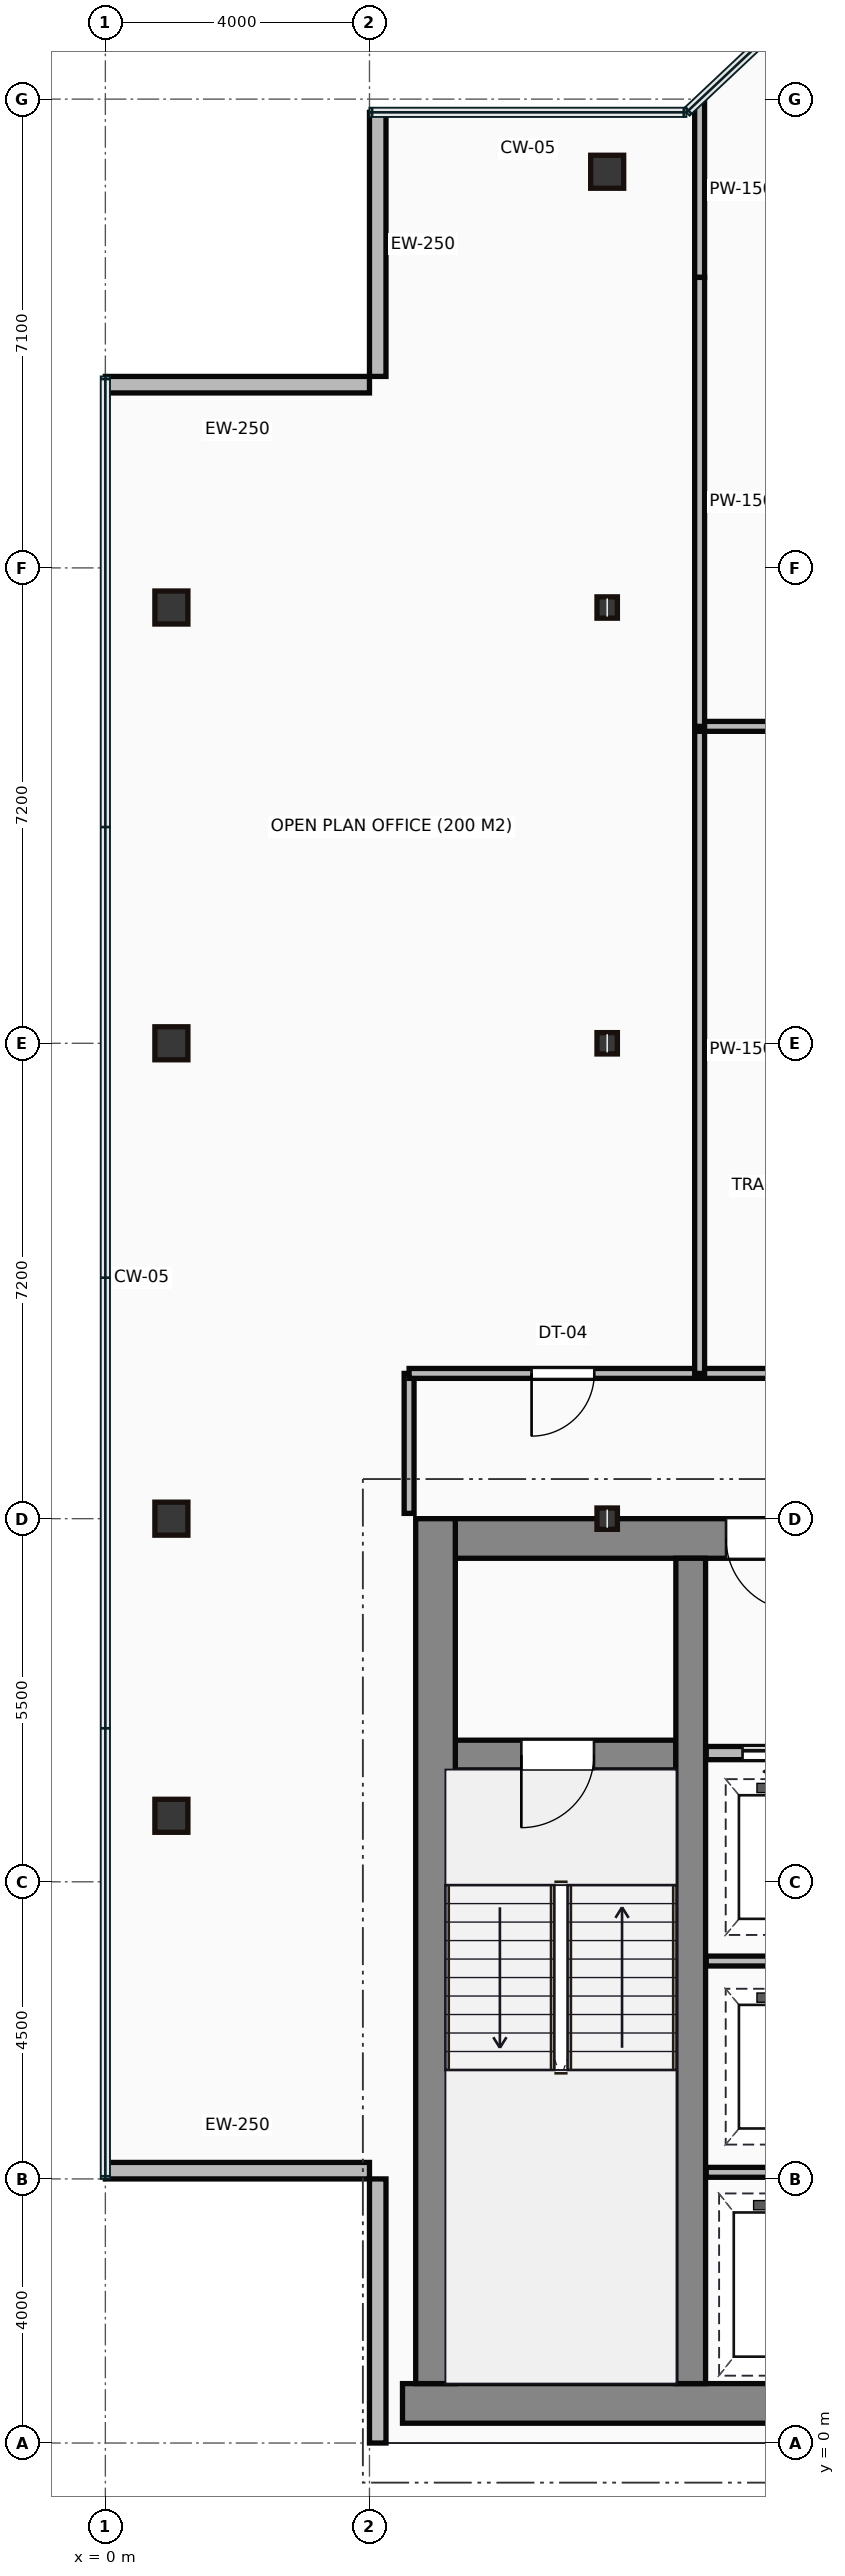
"""IFC4 building model, lengths in metres.
Left out: names, types, materials, properties, quantities, classifications, styles, units other than length and angle.
Written with IfcOpenShell. Run it as: python <this file> out.ifc"""

import sys

from ifc_helpers import new_model, si_unit, direction, frame, frame_2d, origin, origin_2d, place, context, subcontext, project, spatial, rectangle, hollow_rectangle, i_section, extrude, source, transform, mapped, element, fill, save


model = new_model("IFC4")
c1 = context("Model", 3, precision=1e-05, world=origin(), true_north=direction((0.0, 1.0)))
c2 = subcontext(c1, "Body", "Model", "MODEL_VIEW")
j1 = project(units=[si_unit("LENGTHUNIT", "METRE"), si_unit("PLANEANGLEUNIT", "RADIAN")], contexts=[c1])
p1 = place(None, origin())
s1 = spatial("IfcSite", under=j1, at=p1, CompositionType="ELEMENT")
p2 = place(p1, origin())
s2 = spatial("IfcBuilding", under=s1, at=p2, CompositionType="ELEMENT")
p3 = place(p2, frame((0.0, 0.0, 258.8)))
s3 = spatial("IfcBuildingStorey", under=s2, at=p3, CompositionType="ELEMENT", Elevation=258.8)
m1 = source(origin(), c2, "Body", "SweptSolid", [
    extrude(rectangle(XDim=29.5, YDim=0.6, at=frame_2d((14.75, 0.0))), origin(), (0.0, 0.0, 1.0), 3.65),
])
p4 = place(p3, frame((4.5, 0.6, 0.0), z_axis=(0.0, 0.0, 1.0), x_axis=(1.0, 0.0, 0.0)))
e1 = element("IfcWall", 1, at=p4, inside=s3, PredefinedType="SHEAR", context=c2, shape_type="MappedRepresentation", body=[
    mapped(m1, transform((0.0, 0.0, 0.0))),
])
m2 = source(origin(), c2, "Body", "SweptSolid", [
    extrude(rectangle(XDim=13.1, YDim=0.6, at=frame_2d((6.55, 0.0))), origin(), (0.0, 0.0, 1.0), 3.65),
])
p5 = place(p3, frame((5.0, 0.9, 0.0), z_axis=(0.0, 0.0, 1.0), x_axis=(0.0, 1.0, 0.0)))
e2 = element("IfcWall", 2, at=p5, inside=s3, PredefinedType="SHEAR", context=c2, shape_type="MappedRepresentation", body=[
    mapped(m2, transform((0.0, 0.0, 0.0))),
])
m3 = source(origin(), c2, "Body", "SweptSolid", [
    extrude(rectangle(XDim=9.1, YDim=0.6, at=frame_2d((4.55, 0.0))), origin(), (0.0, 0.0, 1.0), 3.65),
])
p6 = place(p3, frame((5.3, 13.7, 0.0), z_axis=(0.0, 0.0, 1.0), x_axis=(1.0, 0.0, 0.0)))
e3 = element("IfcWall", 3, at=p6, inside=s3, PredefinedType="SHEAR", context=c2, shape_type="MappedRepresentation", body=[
    mapped(m3, transform((0.0, 0.0, 0.0))),
])
p7 = place(p6, frame((4.1, 0.0, 0.0)))
e4 = element("IfcOpeningElement", 4, at=p7, cuts=e3, PredefinedType="OPENING", context=c2, shape_type="SweptSolid", body=[
    extrude(rectangle(XDim=1.1, YDim=2.15, at=frame_2d((0.55, 1.075))), frame((0.0, 0.31, 0.0), z_axis=(0.0, -1.0, 0.0), x_axis=(1.0, 0.0, 0.0)), (0.0, 0.0, 1.0), 0.62),
])
m4 = source(origin(), c2, "Body", "SweptSolid", [
    extrude(rectangle(XDim=12.5, YDim=0.45, at=frame_2d((6.25, 0.0))), origin(), (0.0, 0.0, 1.0), 3.65),
])
p8 = place(p3, frame((8.865, 0.9, 0.0), z_axis=(0.0, 0.0, 1.0), x_axis=(0.0, 1.0, 0.0)))
e5 = element("IfcWall", 5, at=p8, inside=s3, PredefinedType="SHEAR", context=c2, shape_type="MappedRepresentation", body=[
    mapped(m4, transform((0.0, 0.0, 0.0))),
])
m5 = source(origin(), c2, "Body", "SweptSolid", [
    extrude(rectangle(XDim=3.39, YDim=0.45, at=frame_2d((1.695, 0.0))), origin(), (0.0, 0.0, 1.0), 3.65),
])
p9 = place(p3, frame((5.25, 10.42, 0.0), z_axis=(0.0, 0.0, 1.0), x_axis=(1.0, 0.0, 0.0)))
e6 = element("IfcWall", 6, at=p9, inside=s3, PredefinedType="SHEAR", context=c2, shape_type="MappedRepresentation", body=[
    mapped(m5, transform((0.0, 0.0, 0.0))),
])
p10 = place(p9, frame((1.05, 0.0, 0.0)))
e7 = element("IfcOpeningElement", 7, at=p10, cuts=e6, PredefinedType="OPENING", context=c2, shape_type="SweptSolid", body=[
    extrude(rectangle(XDim=1.1, YDim=2.15, at=frame_2d((0.55, 1.075))), frame((0.0, 0.235, 0.0), z_axis=(0.0, -1.0, 0.0), x_axis=(1.0, 0.0, 0.0)), (0.0, 0.0, 1.0), 0.47),
])
m6 = source(origin(), c2, "Body", "SweptSolid", [
    extrude(hollow_rectangle(XDim=0.5, YDim=0.5, WallThickness=0.022, at=origin_2d()), origin(), (0.0, 0.0, 1.0), 3.65),
])
for number, where, z_axis, x_axis in (
    (8, (1.0, 9.5, 0.0), (0.0, 0.0, 1.0), (1.0, 0.0, 0.0)),
    (9, (1.0, 14.0, 0.0), (0.0, 0.0, 1.0), (1.0, 0.0, 0.0)),
    (10, (1.0, 21.2, 0.0), (0.0, 0.0, 1.0), (1.0, 0.0, 0.0)),
    (11, (1.0, 27.8, 0.0), (0.0, 0.0, 1.0), (1.0, 0.0, 0.0)),
):
    element("IfcColumn", number, at=place(p3, frame(where, z_axis=z_axis, x_axis=x_axis)), inside=s3, PredefinedType="COLUMN", context=c2, shape_type="MappedRepresentation", body=[
        mapped(m6, transform((0.0, 0.0, 0.0))),
    ])
m7 = source(origin(), c2, "Body", "SweptSolid", [
    extrude(i_section(OverallWidth=0.309, OverallDepth=0.323, WebThickness=0.014, FlangeThickness=0.023, at=origin_2d()), origin(), (0.0, 0.0, 1.0), 3.65),
])
for number, where, z_axis, x_axis in (
    (12, (7.6, 14.0, 0.0), (0.0, 0.0, 1.0), (1.0, 0.0, 0.0)),
    (13, (7.6, 21.2, 0.0), (0.0, 0.0, 1.0), (1.0, 0.0, 0.0)),
    (14, (7.6, 27.8, 0.0), (0.0, 0.0, 1.0), (1.0, 0.0, 0.0)),
):
    element("IfcColumn", number, at=place(p3, frame(where, z_axis=z_axis, x_axis=x_axis)), inside=s3, PredefinedType="COLUMN", context=c2, shape_type="MappedRepresentation", body=[
        mapped(m7, transform((0.0, 0.0, 0.0))),
    ])
p11 = place(p3, frame((7.6, 34.4, 0.0), z_axis=(0.0, 0.0, 1.0), x_axis=(1.0, 0.0, 0.0)))
e15 = element("IfcColumn", 15, at=p11, inside=s3, PredefinedType="COLUMN", context=c2, shape_type="MappedRepresentation", body=[
    mapped(m6, transform((0.0, 0.0, 0.0))),
])
m8 = source(origin(), c2, "Body", "SweptSolid", [
    extrude(rectangle(XDim=4.0, YDim=0.25, at=frame_2d((2.0, 0.0))), origin(), (0.0, 0.0, 1.0), 3.4),
])
for number, where, z_axis, x_axis in (
    (16, (4.125, 35.3, 0.0), (0.0, 0.0, 1.0), (0.0, -1.0, 0.0)),
    (17, (4.0, 31.175, 0.0), (0.0, 0.0, 1.0), (-1.0, 0.0, 0.0)),
    (18, (0.0, 4.125, 0.0), (0.0, 0.0, 1.0), (1.0, 0.0, 0.0)),
    (19, (4.125, 4.0, 0.0), (0.0, 0.0, 1.0), (0.0, -1.0, 0.0)),
):
    element("IfcWall", number, at=place(p3, frame(where, z_axis=z_axis, x_axis=x_axis)), inside=s3, PredefinedType="STANDARD", context=c2, shape_type="MappedRepresentation", body=[
        mapped(m8, transform((0.0, 0.0, 0.0))),
    ])
m9 = source(origin(), c2, "Body", "SweptSolid", [
    extrude(rectangle(XDim=2.35, YDim=0.2, at=frame_2d((1.175, 0.0))), origin(), (0.0, 0.0, 1.0), 3.4),
])
p12 = place(p3, frame((9.1, 10.45, 0.0), z_axis=(0.0, 0.0, 1.0), x_axis=(1.0, 0.0, 0.0)))
e20 = element("IfcWall", 20, at=p12, inside=s3, PredefinedType="PARTITIONING", context=c2, shape_type="MappedRepresentation", body=[
    mapped(m9, transform((0.0, 0.0, 0.0))),
])
p13 = place(p12, frame((0.55, 0.0, 0.0)))
e21 = element("IfcOpeningElement", 21, at=p13, cuts=e20, PredefinedType="OPENING", context=c2, shape_type="SweptSolid", body=[
    extrude(rectangle(XDim=1.1, YDim=2.15, at=frame_2d((0.55, 1.075))), frame((0.0, 0.11, 0.0), z_axis=(0.0, -1.0, 0.0), x_axis=(1.0, 0.0, 0.0)), (0.0, 0.0, 1.0), 0.22),
])
m10 = source(origin(), c2, "Body", "SweptSolid", [
    extrude(rectangle(XDim=2.4, YDim=0.15, at=frame_2d((1.2, 0.0))), origin(), (0.0, 0.0, 1.0), 3.4),
])
for number, where, z_axis, x_axis in (
    (22, (9.1, 4.1, 0.0), (0.0, 0.0, 1.0), (1.0, 0.0, 0.0)),
    (23, (9.1, 7.3, 0.0), (0.0, 0.0, 1.0), (1.0, 0.0, 0.0)),
):
    element("IfcWall", number, at=place(p3, frame(where, z_axis=z_axis, x_axis=x_axis)), inside=s3, PredefinedType="PARTITIONING", context=c2, shape_type="MappedRepresentation", body=[
        mapped(m10, transform((0.0, 0.0, 0.0))),
    ])
m11 = source(origin(), c2, "Body", "SweptSolid", [
    extrude(rectangle(XDim=2.12, YDim=0.15, at=frame_2d((1.06, 0.0))), origin(), (0.0, 0.0, 1.0), 3.4),
])
p14 = place(p3, frame((4.6, 14.08, 0.0), z_axis=(0.0, 0.0, 1.0), x_axis=(0.0, 1.0, 0.0)))
e24 = element("IfcWall", 24, at=p14, inside=s3, PredefinedType="PARTITIONING", context=c2, shape_type="MappedRepresentation", body=[
    mapped(m11, transform((0.0, 0.0, 0.0))),
])
m12 = source(origin(), c2, "Body", "SweptSolid", [
    extrude(rectangle(XDim=12.2, YDim=0.15, at=frame_2d((6.1, 0.0))), origin(), (0.0, 0.0, 1.0), 3.4),
])
p15 = place(p3, frame((4.6, 16.2, 0.0), z_axis=(0.0, 0.0, 1.0), x_axis=(1.0, 0.0, 0.0)))
e25 = element("IfcWall", 25, at=p15, inside=s3, PredefinedType="PARTITIONING", context=c2, shape_type="MappedRepresentation", body=[
    mapped(m12, transform((0.0, 0.0, 0.0))),
])
p16 = place(p15, frame((1.855, 0.0, 0.0)))
e26 = element("IfcOpeningElement", 26, at=p16, cuts=e25, PredefinedType="OPENING", context=c2, shape_type="SweptSolid", body=[
    extrude(rectangle(XDim=0.95, YDim=2.15, at=frame_2d((0.475, 1.075))), frame((0.0, 0.085, 0.0), z_axis=(0.0, -1.0, 0.0), x_axis=(1.0, 0.0, 0.0)), (0.0, 0.0, 1.0), 0.17),
])
m13 = source(origin(), c2, "Body", "SweptSolid", [
    extrude(rectangle(XDim=9.8, YDim=0.15, at=frame_2d((4.9, 0.0))), origin(), (0.0, 0.0, 1.0), 3.4),
])
p17 = place(p3, frame((9.0, 26.0, 0.0), z_axis=(0.0, 0.0, 1.0), x_axis=(0.0, -1.0, 0.0)))
e27 = element("IfcWall", 27, at=p17, inside=s3, PredefinedType="PARTITIONING", context=c2, shape_type="MappedRepresentation", body=[
    mapped(m13, transform((0.0, 0.0, 0.0))),
])
m14 = source(origin(), c2, "Body", "SweptSolid", [
    extrude(rectangle(XDim=7.8, YDim=0.15, at=frame_2d((3.9, 0.0))), origin(), (0.0, 0.0, 1.0), 3.4),
])
p18 = place(p3, frame((9.0, 26.0, 0.0), z_axis=(0.0, 0.0, 1.0), x_axis=(1.0, 0.0, 0.0)))
e28 = element("IfcWall", 28, at=p18, inside=s3, PredefinedType="PARTITIONING", context=c2, shape_type="MappedRepresentation", body=[
    mapped(m14, transform((0.0, 0.0, 0.0))),
])
m15 = source(origin(), c2, "Body", "SweptSolid", [
    extrude(rectangle(XDim=2.661, YDim=0.15, at=frame_2d((1.33, 0.0))), origin(), (0.0, 0.0, 1.0), 3.4),
])
p19 = place(p3, frame((9.0, 35.461, 0.0), z_axis=(0.0, 0.0, 1.0), x_axis=(0.0, -1.0, 0.0)))
e29 = element("IfcWall", 29, at=p19, inside=s3, PredefinedType="PARTITIONING", context=c2, shape_type="MappedRepresentation", body=[
    mapped(m15, transform((0.0, 0.0, 0.0))),
])
m16 = source(origin(), c2, "Body", "SweptSolid", [
    extrude(rectangle(XDim=6.8, YDim=0.15, at=frame_2d((3.4, 0.0))), origin(), (0.0, 0.0, 1.0), 3.4),
])
p20 = place(p3, frame((9.0, 32.8, 0.0), z_axis=(0.0, 0.0, 1.0), x_axis=(0.0, -1.0, 0.0)))
e30 = element("IfcWall", 30, at=p20, inside=s3, PredefinedType="PARTITIONING", context=c2, shape_type="MappedRepresentation", body=[
    mapped(m16, transform((0.0, 0.0, 0.0))),
])
m17 = source(origin(), c2, "Body", "SweptSolid", [
    extrude(rectangle(XDim=1.1, YDim=2.15, at=frame_2d((0.55, 1.075))), frame((0.0, 0.025, 0.0), z_axis=(0.0, -1.0, 0.0), x_axis=(1.0, 0.0, 0.0)), (0.0, 0.0, 1.0), 0.05),
])
p21 = place(p10, frame((1.1, 0.0, 0.0), z_axis=(0.0, 0.0, 1.0), x_axis=(-1.0, 0.0, 0.0)))
e31 = element("IfcDoor", 31, at=p21, inside=s3, OperationType="SINGLE_SWING_LEFT", PredefinedType="DOOR", context=c2, shape_type="MappedRepresentation", body=[
    mapped(m17, transform((0.0, 0.0, 0.0))),
])
fill(e7, e31)
p22 = place(p7, origin())
e32 = element("IfcDoor", 32, at=p22, inside=s3, OperationType="SINGLE_SWING_RIGHT", PredefinedType="DOOR", context=c2, shape_type="MappedRepresentation", body=[
    mapped(m17, transform((0.0, 0.0, 0.0))),
])
fill(e4, e32)
p23 = place(p13, origin())
e33 = element("IfcDoor", 33, at=p23, inside=s3, OperationType="SLIDING_TO_LEFT", PredefinedType="DOOR", context=c2, shape_type="MappedRepresentation", body=[
    mapped(m17, transform((0.0, 0.0, 0.0))),
])
fill(e21, e33)
m18 = source(origin(), c2, "Body", "SweptSolid", [
    extrude(rectangle(XDim=0.95, YDim=2.15, at=frame_2d((0.475, 1.075))), frame((0.0, 0.025, 0.0), z_axis=(0.0, -1.0, 0.0), x_axis=(1.0, 0.0, 0.0)), (0.0, 0.0, 1.0), 0.05),
])
p24 = place(p16, origin())
e34 = element("IfcDoor", 34, at=p24, inside=s3, OperationType="SINGLE_SWING_LEFT", PredefinedType="DOOR", context=c2, shape_type="MappedRepresentation", body=[
    mapped(m18, transform((0.0, 0.0, 0.0))),
])
fill(e26, e34)
save(model, sys.argv[1])
